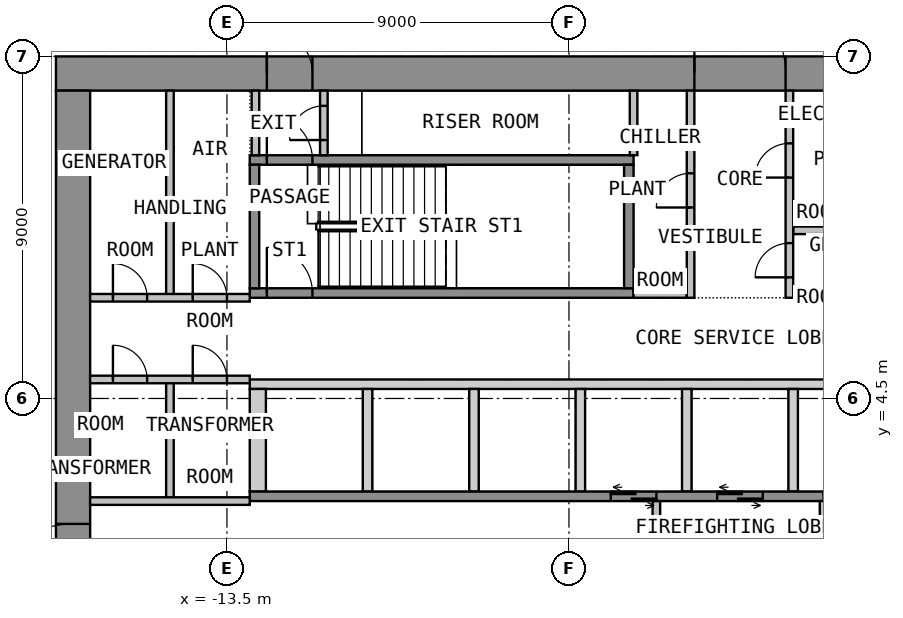
"""IFC4 building model, lengths in metres.
Left out: names, types, materials, properties, quantities, classifications, styles, units other than length and angle.
Written with IfcOpenShell. Run it as: python <this file> out.ifc"""

import sys

from ifc_helpers import new_model, si_unit, direction, frame, frame_2d, origin, place, context, subcontext, project, spatial, polyline, rectangle, outline, extrude, element, fill, save


model = new_model("IFC4")
c1 = context("Model", 3, precision=1e-05, world=origin(), true_north=direction((0.0, 1.0)))
c2 = subcontext(c1, "Body", "Model", "MODEL_VIEW")
j1 = project(units=[si_unit("LENGTHUNIT", "METRE"), si_unit("PLANEANGLEUNIT", "RADIAN")], contexts=[c1])
p1 = place(None, origin())
s1 = spatial("IfcSite", under=j1, at=p1, CompositionType="ELEMENT")
p2 = place(p1, origin())
s2 = spatial("IfcBuilding", under=s1, at=p2, CompositionType="ELEMENT")
p3 = place(p2, frame((0.0, 0.0, 76.8)))
s3 = spatial("IfcBuildingStorey", under=s2, at=p3, CompositionType="ELEMENT", Elevation=76.8)
p4 = place(p3, frame((-18.0, 13.05, 0.0), z_axis=(0.0, 0.0, 1.0), x_axis=(1.0, 0.0, 0.0)))
e1 = element("IfcWall", 1, at=p4, inside=s3, PredefinedType="SHEAR", context=c2, shape_type="SweptSolid", body=[
    extrude(rectangle(XDim=36.0, YDim=0.9, at=frame_2d((18.0, 0.0))), origin(), (0.0, 0.0, 1.0), 4.125),
])
p5 = place(p4, frame((16.8, 0.0, 0.0)))
e2 = element("IfcOpeningElement", 2, at=p5, cuts=e1, PredefinedType="OPENING", context=c2, shape_type="SweptSolid", body=[
    extrude(rectangle(XDim=2.4, YDim=2.1, at=frame_2d((1.2, 1.05))), frame((0.0, 0.46, 0.0), z_axis=(0.0, -1.0, 0.0), x_axis=(1.0, 0.0, 0.0)), (0.0, 0.0, 1.0), 0.92),
])
p6 = place(p4, frame((5.55, 0.0, 0.0)))
e3 = element("IfcOpeningElement", 3, at=p6, cuts=e1, PredefinedType="OPENING", context=c2, shape_type="SweptSolid", body=[
    extrude(rectangle(XDim=1.2, YDim=2.1, at=frame_2d((0.6, 1.05))), frame((0.0, 0.46, 0.0), z_axis=(0.0, -1.0, 0.0), x_axis=(1.0, 0.0, 0.0)), (0.0, 0.0, 1.0), 0.92),
])
p7 = place(p4, frame((29.25, 0.0, 0.0)))
e4 = element("IfcOpeningElement", 4, at=p7, cuts=e1, PredefinedType="OPENING", context=c2, shape_type="SweptSolid", body=[
    extrude(rectangle(XDim=1.2, YDim=2.1, at=frame_2d((0.6, 1.05))), frame((0.0, 0.46, 0.0), z_axis=(0.0, -1.0, 0.0), x_axis=(1.0, 0.0, 0.0)), (0.0, 0.0, 1.0), 0.92),
])
p8 = place(p3, frame((-17.55, -12.6, 0.0), z_axis=(0.0, 0.0, 1.0), x_axis=(0.0, 1.0, 0.0)))
e5 = element("IfcWall", 5, at=p8, inside=s3, PredefinedType="SHEAR", context=c2, shape_type="SweptSolid", body=[
    extrude(rectangle(XDim=25.2, YDim=0.9, at=frame_2d((12.6, 0.0))), origin(), (0.0, 0.0, 1.0), 4.125),
])
p9 = place(p8, frame((11.4, 0.0, 0.0)))
e6 = element("IfcOpeningElement", 6, at=p9, cuts=e5, PredefinedType="OPENING", context=c2, shape_type="SweptSolid", body=[
    extrude(rectangle(XDim=2.4, YDim=2.1, at=frame_2d((1.2, 1.05))), frame((0.0, 0.46, 0.0), z_axis=(0.0, -1.0, 0.0), x_axis=(1.0, 0.0, 0.0)), (0.0, 0.0, 1.0), 0.92),
])
p10 = place(p3, origin())
e7 = element("IfcWall", 7, at=p10, inside=s3, PredefinedType="SHEAR", context=c2, shape_type="SweptSolid", body=[
    extrude(outline(polyline([(-12.9, 4.75), (12.9, 4.75), (12.9, 5.0), (-12.9, 5.0), (-12.9, 4.75)])), origin(), (0.0, 0.0, 1.0), 4.125),
])
p11 = place(p3, origin())
e8 = element("IfcWall", 8, at=p11, inside=s3, PredefinedType="SHEAR", context=c2, shape_type="SweptSolid", body=[
    extrude(outline(polyline([(-12.9, 2.05), (-12.475, 2.05), (-12.475, 4.75), (-12.9, 4.75), (-12.9, 2.05)])), origin(), (0.0, 0.0, 1.0), 4.125),
])
p12 = place(p3, origin())
e9 = element("IfcWall", 9, at=p12, inside=s3, PredefinedType="SHEAR", context=c2, shape_type="SweptSolid", body=[
    extrude(outline(polyline([(-9.925, 2.05), (-9.675, 2.05), (-9.675, 4.75), (-9.925, 4.75), (-9.925, 2.05)])), origin(), (0.0, 0.0, 1.0), 4.125),
])
p13 = place(p3, origin())
e10 = element("IfcWall", 10, at=p13, inside=s3, PredefinedType="SHEAR", context=c2, shape_type="SweptSolid", body=[
    extrude(outline(polyline([(-7.125, 2.05), (-6.875, 2.05), (-6.875, 4.75), (-7.125, 4.75), (-7.125, 2.05)])), origin(), (0.0, 0.0, 1.0), 4.125),
])
p14 = place(p3, origin())
e11 = element("IfcWall", 11, at=p14, inside=s3, PredefinedType="SHEAR", context=c2, shape_type="SweptSolid", body=[
    extrude(outline(polyline([(-4.325, 2.05), (-4.075, 2.05), (-4.075, 4.75), (-4.325, 4.75), (-4.325, 2.05)])), origin(), (0.0, 0.0, 1.0), 4.125),
])
p15 = place(p3, origin())
e12 = element("IfcWall", 12, at=p15, inside=s3, PredefinedType="SHEAR", context=c2, shape_type="SweptSolid", body=[
    extrude(outline(polyline([(-1.525, 2.05), (-1.275, 2.05), (-1.275, 4.75), (-1.525, 4.75), (-1.525, 2.05)])), origin(), (0.0, 0.0, 1.0), 4.125),
])
p16 = place(p3, origin())
e13 = element("IfcWall", 13, at=p16, inside=s3, PredefinedType="SHEAR", context=c2, shape_type="SweptSolid", body=[
    extrude(outline(polyline([(1.275, 2.05), (1.525, 2.05), (1.525, 4.75), (1.275, 4.75), (1.275, 2.05)])), origin(), (0.0, 0.0, 1.0), 4.125),
])
p17 = place(p3, frame((-12.9, 1.925, 0.0), z_axis=(0.0, 0.0, 1.0), x_axis=(1.0, 0.0, 0.0)))
e14 = element("IfcWall", 14, at=p17, inside=s3, PredefinedType="SHEAR", context=c2, shape_type="SweptSolid", body=[
    extrude(rectangle(XDim=25.8, YDim=0.25, at=frame_2d((12.9, 0.0))), origin(), (0.0, 0.0, 1.0), 4.125),
])
p18 = place(p17, frame((9.5, 0.0, 0.0)))
e15 = element("IfcOpeningElement", 15, at=p18, cuts=e14, PredefinedType="OPENING", context=c2, shape_type="SweptSolid", body=[
    extrude(rectangle(XDim=1.2, YDim=2.1, at=frame_2d((0.6, 1.05))), frame((0.0, 0.135, 0.0), z_axis=(0.0, -1.0, 0.0), x_axis=(1.0, 0.0, 0.0)), (0.0, 0.0, 1.0), 0.27),
])
p19 = place(p17, frame((12.3, 0.0, 0.0)))
e16 = element("IfcOpeningElement", 16, at=p19, cuts=e14, PredefinedType="OPENING", context=c2, shape_type="SweptSolid", body=[
    extrude(rectangle(XDim=1.2, YDim=2.1, at=frame_2d((0.6, 1.05))), frame((0.0, 0.135, 0.0), z_axis=(0.0, -1.0, 0.0), x_axis=(1.0, 0.0, 0.0)), (0.0, 0.0, 1.0), 0.27),
])
p20 = place(p17, frame((15.1, 0.0, 0.0)))
e17 = element("IfcOpeningElement", 17, at=p20, cuts=e14, PredefinedType="OPENING", context=c2, shape_type="SweptSolid", body=[
    extrude(rectangle(XDim=1.2, YDim=2.1, at=frame_2d((0.6, 1.05))), frame((0.0, 0.135, 0.0), z_axis=(0.0, -1.0, 0.0), x_axis=(1.0, 0.0, 0.0)), (0.0, 0.0, 1.0), 0.27),
])
p21 = place(p17, frame((17.9, 0.0, 0.0)))
e18 = element("IfcOpeningElement", 18, at=p21, cuts=e14, PredefinedType="OPENING", context=c2, shape_type="SweptSolid", body=[
    extrude(rectangle(XDim=1.2, YDim=2.1, at=frame_2d((0.6, 1.05))), frame((0.0, 0.135, 0.0), z_axis=(0.0, -1.0, 0.0), x_axis=(1.0, 0.0, 0.0)), (0.0, 0.0, 1.0), 0.27),
])
p22 = place(p17, frame((20.7, 0.0, 0.0)))
e19 = element("IfcOpeningElement", 19, at=p22, cuts=e14, PredefinedType="OPENING", context=c2, shape_type="SweptSolid", body=[
    extrude(rectangle(XDim=1.2, YDim=2.1, at=frame_2d((0.6, 1.05))), frame((0.0, 0.135, 0.0), z_axis=(0.0, -1.0, 0.0), x_axis=(1.0, 0.0, 0.0)), (0.0, 0.0, 1.0), 0.27),
])
p23 = place(p17, frame((23.5, 0.0, 0.0)))
e20 = element("IfcOpeningElement", 20, at=p23, cuts=e14, PredefinedType="OPENING", context=c2, shape_type="SweptSolid", body=[
    extrude(rectangle(XDim=1.2, YDim=2.1, at=frame_2d((0.6, 1.05))), frame((0.0, 0.135, 0.0), z_axis=(0.0, -1.0, 0.0), x_axis=(1.0, 0.0, 0.0)), (0.0, 0.0, 1.0), 0.27),
])
p24 = place(p3, frame((-2.2, -1.8, 0.0), z_axis=(0.0, 0.0, 1.0), x_axis=(0.0, 1.0, 0.0)))
e21 = element("IfcWall", 21, at=p24, inside=s3, PredefinedType="PARTITIONING", context=c2, shape_type="SweptSolid", body=[
    extrude(rectangle(XDim=3.6, YDim=0.2, at=frame_2d((1.8, 0.0))), origin(), (0.0, 0.0, 1.0), 4.125),
])
p25 = place(p24, frame((1.2, 0.0, 0.0)))
e22 = element("IfcOpeningElement", 22, at=p25, cuts=e21, PredefinedType="OPENING", context=c2, shape_type="SweptSolid", body=[
    extrude(rectangle(XDim=1.2, YDim=2.1, at=frame_2d((0.6, 1.05))), frame((0.0, 0.11, 0.0), z_axis=(0.0, -1.0, 0.0), x_axis=(1.0, 0.0, 0.0)), (0.0, 0.0, 1.0), 0.22),
])
p26 = place(p3, frame((2.2, -1.8, 0.0), z_axis=(0.0, 0.0, 1.0), x_axis=(0.0, 1.0, 0.0)))
e23 = element("IfcWall", 23, at=p26, inside=s3, PredefinedType="PARTITIONING", context=c2, shape_type="SweptSolid", body=[
    extrude(rectangle(XDim=3.6, YDim=0.2, at=frame_2d((1.8, 0.0))), origin(), (0.0, 0.0, 1.0), 4.125),
])
p27 = place(p26, frame((1.2, 0.0, 0.0)))
e24 = element("IfcOpeningElement", 24, at=p27, cuts=e23, PredefinedType="OPENING", context=c2, shape_type="SweptSolid", body=[
    extrude(rectangle(XDim=1.2, YDim=2.1, at=frame_2d((0.6, 1.05))), frame((0.0, 0.11, 0.0), z_axis=(0.0, -1.0, 0.0), x_axis=(1.0, 0.0, 0.0)), (0.0, 0.0, 1.0), 0.22),
])
p28 = place(p3, frame((-12.9, 7.275, 0.0), z_axis=(0.0, 0.0, 1.0), x_axis=(1.0, 0.0, 0.0)))
e25 = element("IfcWall", 25, at=p28, inside=s3, PredefinedType="SHEAR", context=c2, shape_type="SweptSolid", body=[
    extrude(rectangle(XDim=10.1, YDim=0.25, at=frame_2d((5.05, 0.0))), origin(), (0.0, 0.0, 1.0), 4.125),
])
p29 = place(p28, frame((0.45, 0.0, 0.0)))
e26 = element("IfcOpeningElement", 26, at=p29, cuts=e25, PredefinedType="OPENING", context=c2, shape_type="SweptSolid", body=[
    extrude(rectangle(XDim=1.2, YDim=2.1, at=frame_2d((0.6, 1.05))), frame((0.0, 0.135, 0.0), z_axis=(0.0, -1.0, 0.0), x_axis=(1.0, 0.0, 0.0)), (0.0, 0.0, 1.0), 0.27),
])
p30 = place(p3, frame((-12.9, 10.775, 0.0), z_axis=(0.0, 0.0, 1.0), x_axis=(1.0, 0.0, 0.0)))
e27 = element("IfcWall", 27, at=p30, inside=s3, PredefinedType="SHEAR", context=c2, shape_type="SweptSolid", body=[
    extrude(rectangle(XDim=10.1, YDim=0.25, at=frame_2d((5.05, 0.0))), origin(), (0.0, 0.0, 1.0), 4.125),
])
p31 = place(p30, frame((0.45, 0.0, 0.0)))
e28 = element("IfcOpeningElement", 28, at=p31, cuts=e27, PredefinedType="OPENING", context=c2, shape_type="SweptSolid", body=[
    extrude(rectangle(XDim=1.2, YDim=2.1, at=frame_2d((0.6, 1.05))), frame((0.0, 0.135, 0.0), z_axis=(0.0, -1.0, 0.0), x_axis=(1.0, 0.0, 0.0)), (0.0, 0.0, 1.0), 0.27),
])
for number, where, z_axis, x_axis in (
    (29, (-12.775, 7.4, 0.0), (0.0, 0.0, 1.0), (0.0, 1.0, 0.0)),
    (30, (-2.925, 7.4, 0.0), (0.0, 0.0, 1.0), (0.0, 1.0, 0.0)),
):
    element("IfcWall", number, at=place(p3, frame(where, z_axis=z_axis, x_axis=x_axis)), inside=s3, PredefinedType="SHEAR", context=c2, shape_type="SweptSolid", body=[
        extrude(rectangle(XDim=3.25, YDim=0.25, at=frame_2d((1.625, 0.0))), origin(), (0.0, 0.0, 1.0), 4.125),
    ])
for number, where, z_axis, x_axis in (
    (31, (-2.8, 7.25, 0.0), (0.0, 0.0, 1.0), (1.0, 0.0, 0.0)),
    (32, (1.4, 7.25, 0.0), (0.0, 0.0, 1.0), (1.0, 0.0, 0.0)),
    (33, (1.4, 8.925, 0.0), (0.0, 0.0, 1.0), (1.0, 0.0, 0.0)),
):
    element("IfcWall", number, at=place(p3, frame(where, z_axis=z_axis, x_axis=x_axis)), inside=s3, PredefinedType="PARTITIONING", context=c2, shape_type="SweptSolid", body=[
        extrude(rectangle(XDim=1.4, YDim=0.2, at=frame_2d((0.7, 0.0))), origin(), (0.0, 0.0, 1.0), 4.125),
    ])
p32 = place(p3, frame((-1.3, 7.15, 0.0), z_axis=(0.0, 0.0, 1.0), x_axis=(0.0, 1.0, 0.0)))
e34 = element("IfcWall", 34, at=p32, inside=s3, PredefinedType="PARTITIONING", context=c2, shape_type="SweptSolid", body=[
    extrude(rectangle(XDim=5.45, YDim=0.2, at=frame_2d((2.725, 0.0))), origin(), (0.0, 0.0, 1.0), 4.125),
])
p33 = place(p32, frame((2.375, 0.0, 0.0)))
e35 = element("IfcOpeningElement", 35, at=p33, cuts=e34, PredefinedType="OPENING", context=c2, shape_type="SweptSolid", body=[
    extrude(rectangle(XDim=0.9, YDim=2.1, at=frame_2d((0.45, 1.05))), frame((0.0, 0.11, 0.0), z_axis=(0.0, -1.0, 0.0), x_axis=(1.0, 0.0, 0.0)), (0.0, 0.0, 1.0), 0.22),
])
p34 = place(p3, frame((1.3, 7.15, 0.0), z_axis=(0.0, 0.0, 1.0), x_axis=(0.0, 1.0, 0.0)))
e36 = element("IfcWall", 36, at=p34, inside=s3, PredefinedType="PARTITIONING", context=c2, shape_type="SweptSolid", body=[
    extrude(rectangle(XDim=5.45, YDim=0.2, at=frame_2d((2.725, 0.0))), origin(), (0.0, 0.0, 1.0), 4.125),
])
p35 = place(p34, frame((0.538, 0.0, 0.0)))
e37 = element("IfcOpeningElement", 37, at=p35, cuts=e36, PredefinedType="OPENING", context=c2, shape_type="SweptSolid", body=[
    extrude(rectangle(XDim=0.9, YDim=2.1, at=frame_2d((0.45, 1.05))), frame((0.0, 0.11, 0.0), z_axis=(0.0, -1.0, 0.0), x_axis=(1.0, 0.0, 0.0)), (0.0, 0.0, 1.0), 0.22),
])
p36 = place(p34, frame((3.163, 0.0, 0.0)))
e38 = element("IfcOpeningElement", 38, at=p36, cuts=e36, PredefinedType="OPENING", context=c2, shape_type="SweptSolid", body=[
    extrude(rectangle(XDim=0.9, YDim=2.1, at=frame_2d((0.45, 1.05))), frame((0.0, 0.11, 0.0), z_axis=(0.0, -1.0, 0.0), x_axis=(1.0, 0.0, 0.0)), (0.0, 0.0, 1.0), 0.22),
])
p37 = place(p3, frame((-12.75, 10.9, 0.0), z_axis=(0.0, 0.0, 1.0), x_axis=(0.0, 1.0, 0.0)))
e39 = element("IfcWall", 39, at=p37, inside=s3, PredefinedType="PARTITIONING", context=c2, shape_type="SweptSolid", body=[
    extrude(rectangle(XDim=1.7, YDim=0.2, at=frame_2d((0.85, 0.0))), origin(), (0.0, 0.0, 1.0), 4.125),
])
p38 = place(p3, frame((-10.95, 10.9, 0.0), z_axis=(0.0, 0.0, 1.0), x_axis=(0.0, 1.0, 0.0)))
e40 = element("IfcWall", 40, at=p38, inside=s3, PredefinedType="PARTITIONING", context=c2, shape_type="SweptSolid", body=[
    extrude(rectangle(XDim=1.7, YDim=0.2, at=frame_2d((0.85, 0.0))), origin(), (0.0, 0.0, 1.0), 4.125),
])
p39 = place(p38, frame((0.4, 0.0, 0.0)))
e41 = element("IfcOpeningElement", 41, at=p39, cuts=e40, PredefinedType="OPENING", context=c2, shape_type="SweptSolid", body=[
    extrude(rectangle(XDim=0.9, YDim=2.1, at=frame_2d((0.45, 1.05))), frame((0.0, 0.11, 0.0), z_axis=(0.0, -1.0, 0.0), x_axis=(1.0, 0.0, 0.0)), (0.0, 0.0, 1.0), 0.22),
])
p40 = place(p3, frame((-15.0, 7.15, 0.0), z_axis=(0.0, 0.0, 1.0), x_axis=(0.0, 1.0, 0.0)))
e42 = element("IfcWall", 42, at=p40, inside=s3, PredefinedType="PARTITIONING", context=c2, shape_type="SweptSolid", body=[
    extrude(rectangle(XDim=5.45, YDim=0.2, at=frame_2d((2.725, 0.0))), origin(), (0.0, 0.0, 1.0), 4.125),
])
p41 = place(p3, frame((-17.1, 7.15, 0.0), z_axis=(0.0, 0.0, 1.0), x_axis=(1.0, 0.0, 0.0)))
e43 = element("IfcWall", 43, at=p41, inside=s3, PredefinedType="PARTITIONING", context=c2, shape_type="SweptSolid", body=[
    extrude(rectangle(XDim=4.2, YDim=0.2, at=frame_2d((2.1, 0.0))), origin(), (0.0, 0.0, 1.0), 4.125),
])
p42 = place(p41, frame((0.6, 0.0, 0.0)))
e44 = element("IfcOpeningElement", 44, at=p42, cuts=e43, PredefinedType="OPENING", context=c2, shape_type="SweptSolid", body=[
    extrude(rectangle(XDim=0.9, YDim=2.1, at=frame_2d((0.45, 1.05))), frame((0.0, 0.11, 0.0), z_axis=(0.0, -1.0, 0.0), x_axis=(1.0, 0.0, 0.0)), (0.0, 0.0, 1.0), 0.22),
])
p43 = place(p41, frame((2.7, 0.0, 0.0)))
e45 = element("IfcOpeningElement", 45, at=p43, cuts=e43, PredefinedType="OPENING", context=c2, shape_type="SweptSolid", body=[
    extrude(rectangle(XDim=0.9, YDim=2.1, at=frame_2d((0.45, 1.05))), frame((0.0, 0.11, 0.0), z_axis=(0.0, -1.0, 0.0), x_axis=(1.0, 0.0, 0.0)), (0.0, 0.0, 1.0), 0.22),
])
p44 = place(p3, frame((-15.0, 1.8, 0.0), z_axis=(0.0, 0.0, 1.0), x_axis=(0.0, 1.0, 0.0)))
e46 = element("IfcWall", 46, at=p44, inside=s3, PredefinedType="PARTITIONING", context=c2, shape_type="SweptSolid", body=[
    extrude(rectangle(XDim=3.2, YDim=0.2, at=frame_2d((1.6, 0.0))), origin(), (0.0, 0.0, 1.0), 4.125),
])
p45 = place(p3, frame((-17.1, 5.0, 0.0), z_axis=(0.0, 0.0, 1.0), x_axis=(1.0, 0.0, 0.0)))
e47 = element("IfcWall", 47, at=p45, inside=s3, PredefinedType="PARTITIONING", context=c2, shape_type="SweptSolid", body=[
    extrude(rectangle(XDim=4.2, YDim=0.2, at=frame_2d((2.1, 0.0))), origin(), (0.0, 0.0, 1.0), 4.125),
])
p46 = place(p45, frame((0.6, 0.0, 0.0)))
e48 = element("IfcOpeningElement", 48, at=p46, cuts=e47, PredefinedType="OPENING", context=c2, shape_type="SweptSolid", body=[
    extrude(rectangle(XDim=0.9, YDim=2.1, at=frame_2d((0.45, 1.05))), frame((0.0, 0.11, 0.0), z_axis=(0.0, -1.0, 0.0), x_axis=(1.0, 0.0, 0.0)), (0.0, 0.0, 1.0), 0.22),
])
p47 = place(p45, frame((2.7, 0.0, 0.0)))
e49 = element("IfcOpeningElement", 49, at=p47, cuts=e47, PredefinedType="OPENING", context=c2, shape_type="SweptSolid", body=[
    extrude(rectangle(XDim=0.9, YDim=2.1, at=frame_2d((0.45, 1.05))), frame((0.0, 0.11, 0.0), z_axis=(0.0, -1.0, 0.0), x_axis=(1.0, 0.0, 0.0)), (0.0, 0.0, 1.0), 0.22),
])
p48 = place(p3, frame((-17.1, 1.8, 0.0), z_axis=(0.0, 0.0, 1.0), x_axis=(1.0, 0.0, 0.0)))
e50 = element("IfcWall", 50, at=p48, inside=s3, PredefinedType="PARTITIONING", context=c2, shape_type="SweptSolid", body=[
    extrude(rectangle(XDim=4.2, YDim=0.2, at=frame_2d((2.1, 0.0))), origin(), (0.0, 0.0, 1.0), 4.125),
])
p49 = place(p3, frame((-2.8, 10.901, 0.0), z_axis=(0.0, 0.0, 1.0), x_axis=(0.0, 1.0, 0.0)))
e51 = element("IfcWall", 51, at=p49, inside=s3, PredefinedType="PARTITIONING", context=c2, shape_type="SweptSolid", body=[
    extrude(rectangle(XDim=1.698, YDim=0.2, at=frame_2d((0.849, 0.0))), origin(), (0.0, 0.0, 1.0), 4.125),
])
p50 = place(p9, origin())
e52 = element("IfcDoor", 52, at=p50, inside=s3, OperationType="DOUBLE_DOOR_DOUBLE_SWING", PredefinedType="DOOR", context=c2, shape_type="SweptSolid", body=[
    extrude(rectangle(XDim=2.4, YDim=2.1, at=frame_2d((1.2, 1.05))), frame((0.0, 0.025, 0.0), z_axis=(0.0, -1.0, 0.0), x_axis=(1.0, 0.0, 0.0)), (0.0, 0.0, 1.0), 0.05),
])
fill(e6, e52)
p51 = place(p5, origin())
e53 = element("IfcDoor", 53, at=p51, inside=s3, OperationType="DOUBLE_DOOR_DOUBLE_SWING", PredefinedType="DOOR", context=c2, shape_type="SweptSolid", body=[
    extrude(rectangle(XDim=2.4, YDim=2.1, at=frame_2d((1.2, 1.05))), frame((0.0, 0.025, 0.0), z_axis=(0.0, -1.0, 0.0), x_axis=(1.0, 0.0, 0.0)), (0.0, 0.0, 1.0), 0.05),
])
fill(e2, e53)
p52 = place(p6, origin())
e54 = element("IfcDoor", 54, at=p52, inside=s3, OperationType="SINGLE_SWING_RIGHT", PredefinedType="DOOR", context=c2, shape_type="SweptSolid", body=[
    extrude(rectangle(XDim=1.2, YDim=2.1, at=frame_2d((0.6, 1.05))), frame((0.0, 0.025, 0.0), z_axis=(0.0, -1.0, 0.0), x_axis=(1.0, 0.0, 0.0)), (0.0, 0.0, 1.0), 0.05),
])
fill(e3, e54)
p53 = place(p18, origin())
e55 = element("IfcDoor", 55, at=p53, inside=s3, OperationType="DOUBLE_DOOR_SLIDING", PredefinedType="DOOR", context=c2, shape_type="SweptSolid", body=[
    extrude(rectangle(XDim=1.2, YDim=2.1, at=frame_2d((0.6, 1.05))), frame((0.0, 0.025, 0.0), z_axis=(0.0, -1.0, 0.0), x_axis=(1.0, 0.0, 0.0)), (0.0, 0.0, 1.0), 0.05),
])
fill(e15, e55)
p54 = place(p19, origin())
e56 = element("IfcDoor", 56, at=p54, inside=s3, OperationType="DOUBLE_DOOR_SLIDING", PredefinedType="DOOR", context=c2, shape_type="SweptSolid", body=[
    extrude(rectangle(XDim=1.2, YDim=2.1, at=frame_2d((0.6, 1.05))), frame((0.0, 0.025, 0.0), z_axis=(0.0, -1.0, 0.0), x_axis=(1.0, 0.0, 0.0)), (0.0, 0.0, 1.0), 0.05),
])
fill(e16, e56)
p55 = place(p29, origin())
e57 = element("IfcDoor", 57, at=p55, inside=s3, OperationType="SINGLE_SWING_LEFT", PredefinedType="DOOR", context=c2, shape_type="SweptSolid", body=[
    extrude(rectangle(XDim=1.2, YDim=2.1, at=frame_2d((0.6, 1.05))), frame((0.0, 0.025, 0.0), z_axis=(0.0, -1.0, 0.0), x_axis=(1.0, 0.0, 0.0)), (0.0, 0.0, 1.0), 0.05),
])
fill(e26, e57)
p56 = place(p33, origin())
e58 = element("IfcDoor", 58, at=p56, inside=s3, OperationType="SINGLE_SWING_LEFT", PredefinedType="DOOR", context=c2, shape_type="SweptSolid", body=[
    extrude(rectangle(XDim=0.9, YDim=2.1, at=frame_2d((0.45, 1.05))), frame((0.0, 0.025, 0.0), z_axis=(0.0, -1.0, 0.0), x_axis=(1.0, 0.0, 0.0)), (0.0, 0.0, 1.0), 0.05),
])
fill(e35, e58)
p57 = place(p35, origin())
e59 = element("IfcDoor", 59, at=p57, inside=s3, OperationType="SINGLE_SWING_LEFT", PredefinedType="DOOR", context=c2, shape_type="SweptSolid", body=[
    extrude(rectangle(XDim=0.9, YDim=2.1, at=frame_2d((0.45, 1.05))), frame((0.0, 0.025, 0.0), z_axis=(0.0, -1.0, 0.0), x_axis=(1.0, 0.0, 0.0)), (0.0, 0.0, 1.0), 0.05),
])
fill(e37, e59)
p58 = place(p36, origin())
e60 = element("IfcDoor", 60, at=p58, inside=s3, OperationType="SINGLE_SWING_LEFT", PredefinedType="DOOR", context=c2, shape_type="SweptSolid", body=[
    extrude(rectangle(XDim=0.9, YDim=2.1, at=frame_2d((0.45, 1.05))), frame((0.0, 0.025, 0.0), z_axis=(0.0, -1.0, 0.0), x_axis=(1.0, 0.0, 0.0)), (0.0, 0.0, 1.0), 0.05),
])
fill(e38, e60)
p59 = place(p31, origin())
e61 = element("IfcDoor", 61, at=p59, inside=s3, OperationType="SINGLE_SWING_RIGHT", PredefinedType="DOOR", context=c2, shape_type="SweptSolid", body=[
    extrude(rectangle(XDim=1.2, YDim=2.1, at=frame_2d((0.6, 1.05))), frame((0.0, 0.025, 0.0), z_axis=(0.0, -1.0, 0.0), x_axis=(1.0, 0.0, 0.0)), (0.0, 0.0, 1.0), 0.05),
])
fill(e28, e61)
p60 = place(p39, origin())
e62 = element("IfcDoor", 62, at=p60, inside=s3, OperationType="SINGLE_SWING_LEFT", PredefinedType="DOOR", context=c2, shape_type="SweptSolid", body=[
    extrude(rectangle(XDim=0.9, YDim=2.1, at=frame_2d((0.45, 1.05))), frame((0.0, 0.025, 0.0), z_axis=(0.0, -1.0, 0.0), x_axis=(1.0, 0.0, 0.0)), (0.0, 0.0, 1.0), 0.05),
])
fill(e41, e62)
p61 = place(p42, origin())
e63 = element("IfcDoor", 63, at=p61, inside=s3, OperationType="SINGLE_SWING_LEFT", PredefinedType="DOOR", context=c2, shape_type="SweptSolid", body=[
    extrude(rectangle(XDim=0.9, YDim=2.1, at=frame_2d((0.45, 1.05))), frame((0.0, 0.025, 0.0), z_axis=(0.0, -1.0, 0.0), x_axis=(1.0, 0.0, 0.0)), (0.0, 0.0, 1.0), 0.05),
])
fill(e44, e63)
p62 = place(p43, origin())
e64 = element("IfcDoor", 64, at=p62, inside=s3, OperationType="SINGLE_SWING_LEFT", PredefinedType="DOOR", context=c2, shape_type="SweptSolid", body=[
    extrude(rectangle(XDim=0.9, YDim=2.1, at=frame_2d((0.45, 1.05))), frame((0.0, 0.025, 0.0), z_axis=(0.0, -1.0, 0.0), x_axis=(1.0, 0.0, 0.0)), (0.0, 0.0, 1.0), 0.05),
])
fill(e45, e64)
p63 = place(p46, origin())
e65 = element("IfcDoor", 65, at=p63, inside=s3, OperationType="SINGLE_SWING_LEFT", PredefinedType="DOOR", context=c2, shape_type="SweptSolid", body=[
    extrude(rectangle(XDim=0.9, YDim=2.1, at=frame_2d((0.45, 1.05))), frame((0.0, 0.025, 0.0), z_axis=(0.0, -1.0, 0.0), x_axis=(1.0, 0.0, 0.0)), (0.0, 0.0, 1.0), 0.05),
])
fill(e48, e65)
p64 = place(p47, origin())
e66 = element("IfcDoor", 66, at=p64, inside=s3, OperationType="SINGLE_SWING_LEFT", PredefinedType="DOOR", context=c2, shape_type="SweptSolid", body=[
    extrude(rectangle(XDim=0.9, YDim=2.1, at=frame_2d((0.45, 1.05))), frame((0.0, 0.025, 0.0), z_axis=(0.0, -1.0, 0.0), x_axis=(1.0, 0.0, 0.0)), (0.0, 0.0, 1.0), 0.05),
])
fill(e49, e66)
save(model, sys.argv[1])
